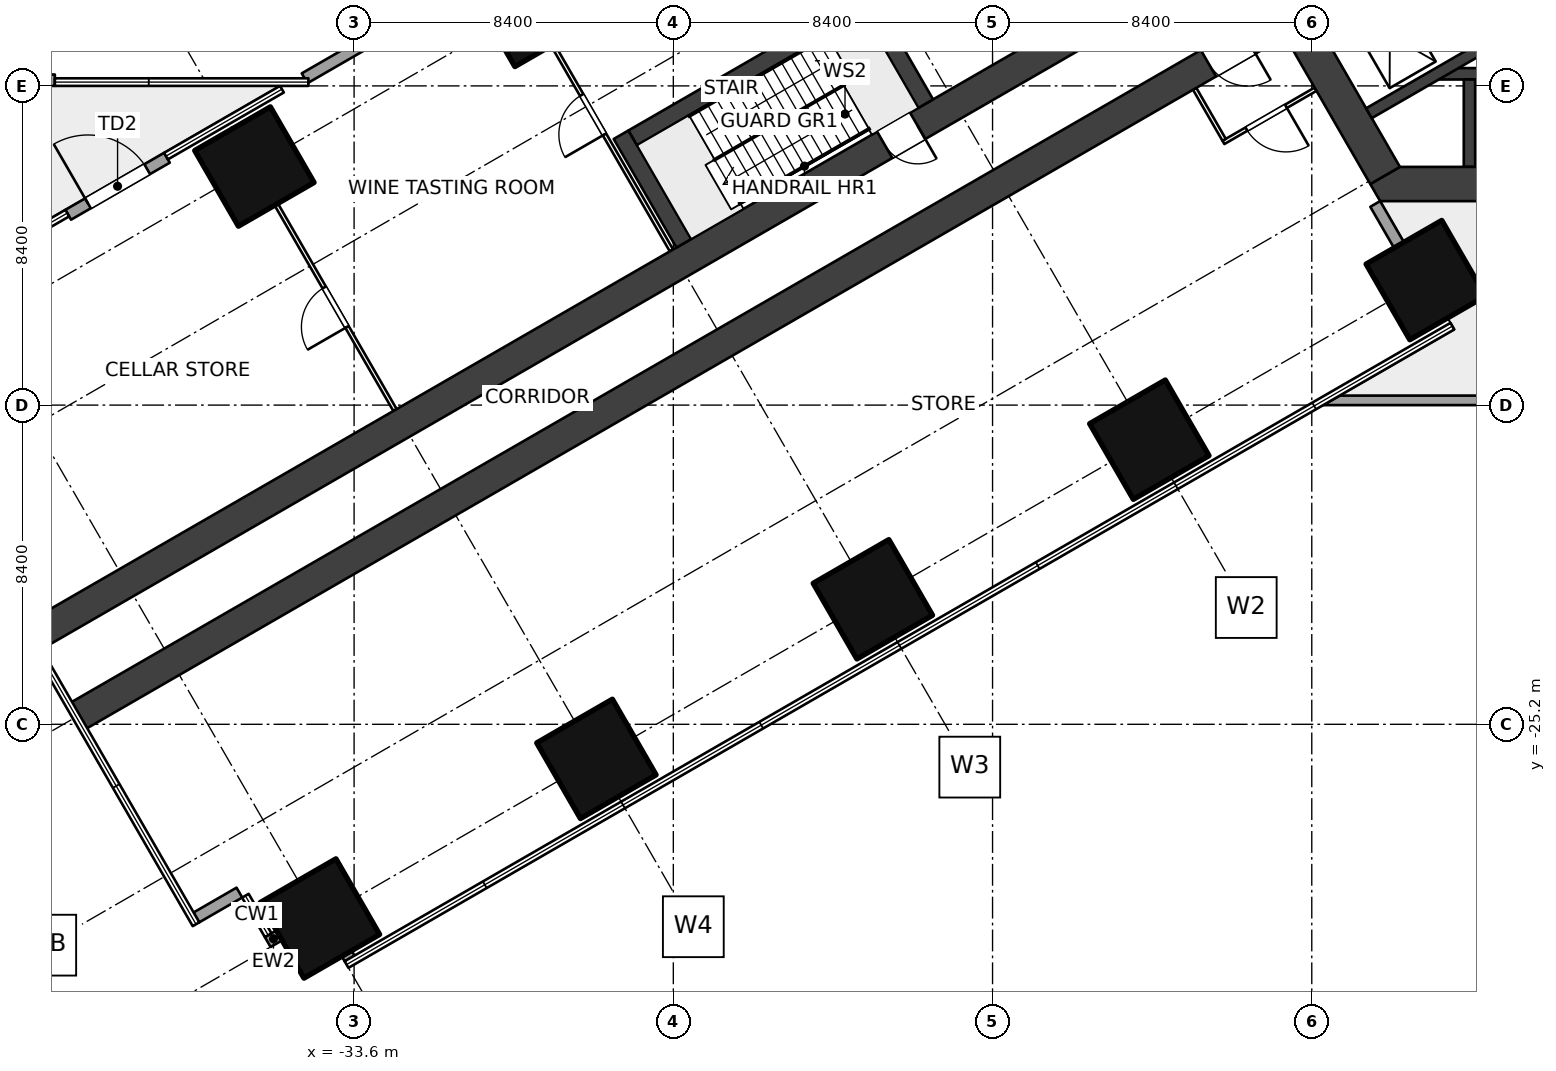
"""IFC4 building model, lengths in metres.
Left out: names, types, materials, properties, quantities, classifications, styles, units other than length and angle.
Written with IfcOpenShell. Run it as: python <this file> out.ifc"""

import sys

from ifc_helpers import new_model, si_unit, direction, frame, frame_2d, origin, origin_2d, place, context, subcontext, project, spatial, polyline, rectangle, outline, extrude, element, fill, save


model = new_model("IFC4")
c1 = context("Model", 3, precision=1e-05, world=origin(), true_north=direction((0.0, 1.0)))
c2 = subcontext(c1, "Body", "Model", "MODEL_VIEW")
j1 = project(units=[si_unit("LENGTHUNIT", "METRE"), si_unit("PLANEANGLEUNIT", "RADIAN")], contexts=[c1])
p1 = place(None, origin())
s1 = spatial("IfcSite", under=j1, at=p1, CompositionType="ELEMENT")
p2 = place(p1, origin())
s2 = spatial("IfcBuilding", under=s1, at=p2, CompositionType="ELEMENT")
p3 = place(p2, frame((0.0, 0.0, 21.0)))
s3 = spatial("IfcBuildingStorey", under=s2, at=p3, CompositionType="ELEMENT", Elevation=21.0)
for number, where, z_axis, x_axis in (
    (1, (-5.4, -13.51, 0.0), (0.0, 0.0, 1.0), (-0.5, 0.866, 0.0)),
    (2, (-12.675, -17.71, 0.0), (0.0, 0.0, 1.0), (-0.5, 0.866, 0.0)),
    (3, (-19.949, -21.91, 0.0), (0.0, 0.0, 1.0), (-0.5, 0.866, 0.0)),
    (4, (-28.949, -6.322, 0.0), (0.0, 0.0, 1.0), (-0.5, 0.866, 0.0)),
    (5, (-27.224, -26.11, 0.0), (0.0, 0.0, 1.0), (-0.5, 0.866, 0.0)),
    (6, (-36.224, -10.521, 0.0), (0.0, 0.0, 1.0), (-0.5, 0.866, 0.0)),
    (7, (-34.499, -30.31, 0.0), (0.0, 0.0, 1.0), (-0.5, 0.866, 0.0)),
):
    element("IfcColumn", number, at=place(p3, frame(where, z_axis=z_axis, x_axis=x_axis)), inside=s3, PredefinedType="COLUMN", context=c2, shape_type="SweptSolid", body=[
        extrude(rectangle(XDim=2.3, YDim=2.3, at=origin_2d()), origin(), (0.0, 0.0, 1.0), 5.0),
    ])
p4 = place(p3, frame((-6.47, -10.757, 0.0), z_axis=(0.0, 0.0, 1.0), x_axis=(-0.499997612506, 0.8660267822, 0.0)))
e8 = element("IfcWall", 8, at=p4, inside=s3, PredefinedType="SHEAR", context=c2, shape_type="SweptSolid", body=[
    extrude(rectangle(XDim=12.161, YDim=0.9, at=frame_2d((6.08, 0.0))), origin(), (0.0, 0.0, 1.0), 5.0),
])
p5 = place(p4, frame((5.33, 0.0, 0.0)))
e9 = element("IfcOpeningElement", 9, at=p5, cuts=e8, PredefinedType="OPENING", context=c2, shape_type="SweptSolid", body=[
    extrude(rectangle(XDim=1.5, YDim=2.1, at=frame_2d((0.75, 1.05))), frame((0.0, 0.46, 0.0), z_axis=(0.0, -1.0, 0.0), x_axis=(1.0, 0.0, 0.0)), (0.0, 0.0, 1.0), 0.92),
])
p6 = place(p3, origin())
e10 = element("IfcWall", 10, at=p6, inside=s3, PredefinedType="SHEAR", context=c2, shape_type="SweptSolid", body=[
    extrude(outline(polyline([(-6.6, -11.432), (6.6, -11.432), (6.86, -10.981), (6.08, -10.531), (-6.08, -10.531), (-6.86, -10.981), (-6.6, -11.432)])), origin(), (0.0, 0.0, 1.0), 5.0),
])
p7 = place(p3, frame((-0.919, -5.669, 0.0), z_axis=(0.0, 0.0, 1.0), x_axis=(-0.866011800373, -0.500023561059, 0.0)))
e11 = element("IfcWall", 11, at=p7, inside=s3, PredefinedType="SHEAR", context=c2, shape_type="SweptSolid", body=[
    extrude(rectangle(XDim=6.902, YDim=0.3, at=frame_2d((3.451, 0.0))), origin(), (0.0, 0.0, 1.0), 5.0),
])
p8 = place(p3, frame((5.098, -8.082, 0.0), z_axis=(0.0, 0.0, 1.0), x_axis=(-1.0, 0.0, 0.0)))
e12 = element("IfcWall", 12, at=p8, inside=s3, PredefinedType="SHEAR", context=c2, shape_type="SweptSolid", body=[
    extrude(rectangle(XDim=10.195, YDim=0.3, at=frame_2d((5.098, 0.0))), origin(), (0.0, 0.0, 1.0), 5.0),
])
p9 = place(p8, frame((1.748, 0.0, 0.0)))
e13 = element("IfcOpeningElement", 13, at=p9, cuts=e12, PredefinedType="OPENING", context=c2, shape_type="SweptSolid", body=[
    extrude(rectangle(XDim=1.1, YDim=2.1, at=frame_2d((0.55, 1.05))), frame((0.0, 0.16, 0.0), z_axis=(0.0, -1.0, 0.0), x_axis=(1.0, 0.0, 0.0)), (0.0, 0.0, 1.0), 0.32),
])
p10 = place(p8, frame((4.548, 0.0, 0.0)))
e14 = element("IfcOpeningElement", 14, at=p10, cuts=e12, PredefinedType="OPENING", context=c2, shape_type="SweptSolid", body=[
    extrude(rectangle(XDim=1.1, YDim=2.1, at=frame_2d((0.55, 1.05))), frame((0.0, 0.16, 0.0), z_axis=(0.0, -1.0, 0.0), x_axis=(1.0, 0.0, 0.0)), (0.0, 0.0, 1.0), 0.32),
])
p11 = place(p8, frame((7.348, 0.0, 0.0)))
e15 = element("IfcOpeningElement", 15, at=p11, cuts=e12, PredefinedType="OPENING", context=c2, shape_type="SweptSolid", body=[
    extrude(rectangle(XDim=1.1, YDim=2.1, at=frame_2d((0.55, 1.05))), frame((0.0, 0.16, 0.0), z_axis=(0.0, -1.0, 0.0), x_axis=(1.0, 0.0, 0.0)), (0.0, 0.0, 1.0), 0.32),
])
p12 = place(p3, frame((-4.25, -8.231, 0.0), z_axis=(0.0, 0.0, 1.0), x_axis=(0.0, -1.0, 0.0)))
e16 = element("IfcWall", 16, at=p12, inside=s3, PredefinedType="SHEAR", context=c2, shape_type="SweptSolid", body=[
    extrude(rectangle(XDim=2.3, YDim=0.3, at=frame_2d((1.15, 0.0))), origin(), (0.0, 0.0, 1.0), 5.0),
])
p13 = place(p3, frame((-8.91, -6.53, 0.0), z_axis=(0.0, 0.0, 1.0), x_axis=(-0.866026214035, -0.499998596603, 0.0)))
e17 = element("IfcWall", 17, at=p13, inside=s3, PredefinedType="SHEAR", context=c2, shape_type="SweptSolid", body=[
    extrude(rectangle(XDim=36.888, YDim=0.8, at=frame_2d((18.444, 0.0))), origin(), (0.0, 0.0, 1.0), 5.0),
])
p14 = place(p13, frame((1.35, 0.0, 0.0)))
e18 = element("IfcOpeningElement", 18, at=p14, cuts=e17, PredefinedType="OPENING", context=c2, shape_type="SweptSolid", body=[
    extrude(rectangle(XDim=1.2, YDim=2.1, at=frame_2d((0.6, 1.05))), frame((0.0, 0.41, 0.0), z_axis=(0.0, -1.0, 0.0), x_axis=(1.0, 0.0, 0.0)), (0.0, 0.0, 1.0), 0.82),
])
p15 = place(p3, frame((-10.11, -4.451, 0.0), z_axis=(0.0, 0.0, 1.0), x_axis=(-0.866023348156, -0.500003560437, 0.0)))
e19 = element("IfcWall", 19, at=p15, inside=s3, PredefinedType="SHEAR", context=c2, shape_type="SweptSolid", body=[
    extrude(rectangle(XDim=36.888, YDim=0.8, at=frame_2d((18.444, 0.0))), origin(), (0.0, 0.0, 1.0), 5.0),
])
p16 = place(p15, frame((10.0, 0.0, 0.0)))
e20 = element("IfcOpeningElement", 20, at=p16, cuts=e19, PredefinedType="OPENING", context=c2, shape_type="SweptSolid", body=[
    extrude(rectangle(XDim=1.0, YDim=2.1, at=frame_2d((0.5, 1.05))), frame((0.0, 0.41, 0.0), z_axis=(0.0, -1.0, 0.0), x_axis=(1.0, 0.0, 0.0)), (0.0, 0.0, 1.0), 0.82),
])
p17 = place(p15, frame((2.85, 0.0, 0.0)))
e21 = element("IfcOpeningElement", 21, at=p17, cuts=e19, PredefinedType="OPENING", context=c2, shape_type="SweptSolid", body=[
    extrude(rectangle(XDim=1.2, YDim=2.1, at=frame_2d((0.6, 1.05))), frame((0.0, 0.41, 0.0), z_axis=(0.0, -1.0, 0.0), x_axis=(1.0, 0.0, 0.0)), (0.0, 0.0, 1.0), 0.82),
])
p18 = place(p3, frame((-35.572, -30.757, 0.0), z_axis=(0.0, 0.0, 1.0), x_axis=(-0.865939549016, -0.500148675346, 0.0)))
e22 = element("IfcWall", 22, at=p18, inside=s3, PredefinedType="SOLIDWALL", context=c2, shape_type="SweptSolid", body=[
    extrude(rectangle(XDim=0.347, YDim=0.3, at=frame_2d((0.174, 0.0))), origin(), (0.0, 0.0, 1.0), 4.6),
])
p19 = place(p3, frame((-36.618, -29.629, 0.0), z_axis=(0.0, 0.0, 1.0), x_axis=(-0.866101796549, -0.4998676605, 0.0)))
e23 = element("IfcWall", 23, at=p19, inside=s3, PredefinedType="SOLIDWALL", context=c2, shape_type="SweptSolid", body=[
    extrude(rectangle(XDim=1.31, YDim=0.3, at=frame_2d((0.655, 0.0))), origin(), (0.0, 0.0, 1.0), 4.6),
])
p20 = place(p3, frame((-41.123, -11.791, 0.0), z_axis=(0.0, 0.0, 1.0), x_axis=(0.866010750942, 0.50002537861, 0.0)))
e24 = element("IfcWall", 24, at=p20, inside=s3, PredefinedType="SOLIDWALL", context=c2, shape_type="SweptSolid", body=[
    extrude(rectangle(XDim=3.0, YDim=0.3, at=frame_2d((1.5, 0.0))), origin(), (0.0, 0.0, 1.0), 4.6),
])
p21 = place(p20, frame((0.6, 0.0, 0.0)))
e25 = element("IfcOpeningElement", 25, at=p21, cuts=e24, PredefinedType="OPENING", context=c2, shape_type="SweptSolid", body=[
    extrude(rectangle(XDim=1.8, YDim=2.4, at=frame_2d((0.9, 1.2))), frame((0.0, 0.16, 0.0), z_axis=(0.0, -1.0, 0.0), x_axis=(1.0, 0.0, 0.0)), (0.0, 0.0, 1.0), 0.32),
])
p22 = place(p3, frame((-41.475, -8.25, 0.0), z_axis=(0.0, 0.0, 1.0), x_axis=(-1.0, 0.0, 0.0)))
e26 = element("IfcWall", 26, at=p22, inside=s3, PredefinedType="SOLIDWALL", context=c2, shape_type="SweptSolid", body=[
    extrude(rectangle(XDim=3.0, YDim=0.3, at=frame_2d((1.5, 0.0))), origin(), (0.0, 0.0, 1.0), 4.6),
])
p23 = place(p22, frame((0.6, 0.0, 0.0)))
e27 = element("IfcOpeningElement", 27, at=p23, cuts=e26, PredefinedType="OPENING", context=c2, shape_type="SweptSolid", body=[
    extrude(rectangle(XDim=1.8, YDim=2.4, at=frame_2d((0.9, 1.2))), frame((0.0, 0.16, 0.0), z_axis=(0.0, -1.0, 0.0), x_axis=(1.0, 0.0, 0.0)), (0.0, 0.0, 1.0), 0.32),
])
p24 = place(p3, frame((-6.73, -11.507, 0.0), z_axis=(0.0, 0.0, 1.0), x_axis=(0.500004234368, -0.866022959057, 0.0)))
e28 = element("IfcWall", 28, at=p24, inside=s3, PredefinedType="SOLIDWALL", context=c2, shape_type="SweptSolid", body=[
    extrude(rectangle(XDim=1.25, YDim=0.3, at=frame_2d((0.625, 0.0))), origin(), (0.0, 0.0, 1.0), 4.6),
])
p25 = place(p3, frame((-33.716, -31.365, 0.0), z_axis=(0.0, 0.0, 1.0), x_axis=(-0.499953773667, 0.866052090925, 0.0)))
e29 = element("IfcWall", 29, at=p25, inside=s3, PredefinedType="SOLIDWALL", context=c2, shape_type="SweptSolid", body=[
    extrude(rectangle(XDim=1.005, YDim=0.3, at=frame_2d((0.502, 0.0))), origin(), (0.0, 0.0, 1.0), 4.6),
])
p26 = place(p3, origin())
e30 = element("IfcWall", 30, at=p26, inside=s3, PredefinedType="PARAPET", context=c2, shape_type="SweptSolid", body=[
    extrude(outline(polyline([(8.096, -16.8), (-8.096, -16.8), (-7.663, -16.55), (7.663, -16.55), (8.096, -16.8)])), origin(), (0.0, 0.0, 1.0), 1.1),
])
p27 = place(p3, frame((-8.3, -8.487, 0.0), z_axis=(0.0, 0.0, 1.0), x_axis=(-0.866034573852, -0.49998411664, 0.0)))
e31 = element("IfcWall", 31, at=p27, inside=s3, PredefinedType="PARTITIONING", context=c2, shape_type="SweptSolid", body=[
    extrude(rectangle(XDim=2.8, YDim=0.1, at=frame_2d((1.4, 0.0))), origin(), (0.0, 0.0, 1.0), 4.6),
])
p28 = place(p27, frame((0.9, 0.0, 0.0)))
e32 = element("IfcOpeningElement", 32, at=p28, cuts=e31, PredefinedType="OPENING", context=c2, shape_type="SweptSolid", body=[
    extrude(rectangle(XDim=1.2, YDim=2.1, at=frame_2d((0.6, 1.05))), frame((0.0, 0.06, 0.0), z_axis=(0.0, -1.0, 0.0), x_axis=(1.0, 0.0, 0.0)), (0.0, 0.0, 1.0), 0.12),
])
p29 = place(p3, frame((-11.482, -8.476, 0.0), z_axis=(0.0, 0.0, 1.0), x_axis=(0.500017819788, -0.86601511528, 0.0)))
e33 = element("IfcWall", 33, at=p29, inside=s3, PredefinedType="PARTITIONING", context=c2, shape_type="SweptSolid", body=[
    extrude(rectangle(XDim=1.55, YDim=0.1, at=frame_2d((0.775, 0.0))), origin(), (0.0, 0.0, 1.0), 4.6),
])
p30 = place(p3, frame((-25.249, -12.73, 0.0), z_axis=(0.0, 0.0, 1.0), x_axis=(-0.499987320047, 0.866032724435, 0.0)))
e34 = element("IfcWall", 34, at=p30, inside=s3, PredefinedType="PARTITIONING", context=c2, shape_type="SweptSolid", body=[
    extrude(rectangle(XDim=6.25, YDim=0.1, at=frame_2d((3.125, 0.0))), origin(), (0.0, 0.0, 1.0), 2.8),
])
p31 = place(p30, frame((3.525, 0.0, 0.0)))
e35 = element("IfcOpeningElement", 35, at=p31, cuts=e34, PredefinedType="OPENING", context=c2, shape_type="SweptSolid", body=[
    extrude(rectangle(XDim=1.2, YDim=2.1, at=frame_2d((0.6, 1.05))), frame((0.0, 0.06, 0.0), z_axis=(0.0, -1.0, 0.0), x_axis=(1.0, 0.0, 0.0)), (0.0, 0.0, 1.0), 0.12),
])
p32 = place(p3, frame((-32.524, -16.93, 0.0), z_axis=(0.0, 0.0, 1.0), x_axis=(-0.500004234368, 0.866022959057, 0.0)))
e36 = element("IfcWall", 36, at=p32, inside=s3, PredefinedType="PARTITIONING", context=c2, shape_type="SweptSolid", body=[
    extrude(rectangle(XDim=6.25, YDim=0.1, at=frame_2d((3.125, 0.0))), origin(), (0.0, 0.0, 1.0), 2.8),
])
p33 = place(p32, frame((2.525, 0.0, 0.0)))
e37 = element("IfcOpeningElement", 37, at=p33, cuts=e36, PredefinedType="OPENING", context=c2, shape_type="SweptSolid", body=[
    extrude(rectangle(XDim=1.2, YDim=2.1, at=frame_2d((0.6, 1.05))), frame((0.0, 0.06, 0.0), z_axis=(0.0, -1.0, 0.0), x_axis=(1.0, 0.0, 0.0)), (0.0, 0.0, 1.0), 0.12),
])
p34 = place(p3, frame((-9.45, 6.495, 0.0), z_axis=(0.0, 0.0, 1.0), x_axis=(-0.866027750123, -0.499995936, 0.0)))
e38 = element("IfcWall", 38, at=p34, inside=s3, PredefinedType="SOLIDWALL", context=c2, shape_type="SweptSolid", body=[
    extrude(rectangle(XDim=29.39, YDim=0.3, at=frame_2d((14.695, 0.0))), origin(), (0.0, 0.0, 1.0), 4.6),
])
p35 = place(p34, frame((18.195, 0.0, 0.0)))
e39 = element("IfcOpeningElement", 39, at=p35, cuts=e38, PredefinedType="OPENING", context=c2, shape_type="SweptSolid", body=[
    extrude(rectangle(XDim=1.8, YDim=2.4, at=frame_2d((0.9, 1.2))), frame((0.0, 0.16, 0.0), z_axis=(0.0, -1.0, 0.0), x_axis=(1.0, 0.0, 0.0)), (0.0, 0.0, 1.0), 0.32),
])
for number, where, z_axis, x_axis in (
    (40, (-18.559, -8.868, 0.0), (0.0, 0.0, 1.0), (-0.5, 0.866, 0.0)),
    (41, (-24.925, -12.543, 0.0), (0.0, 0.0, 1.0), (-0.5, 0.866, 0.0)),
):
    element("IfcWall", number, at=place(p3, frame(where, z_axis=z_axis, x_axis=x_axis)), inside=s3, PredefinedType="SOLIDWALL", context=c2, shape_type="SweptSolid", body=[
        extrude(rectangle(XDim=3.3, YDim=0.45, at=frame_2d((1.65, 0.0))), origin(), (0.0, 0.0, 1.0), 5.0),
    ])
p36 = place(p3, frame((-20.292, -6.317, 0.0), z_axis=(0.0, 0.0, 1.0), x_axis=(-0.866028853923, -0.499994024137, 0.0)))
e42 = element("IfcWall", 42, at=p36, inside=s3, PredefinedType="SOLIDWALL", context=c2, shape_type="SweptSolid", body=[
    extrude(rectangle(XDim=6.9, YDim=0.45, at=frame_2d((3.45, 0.0))), origin(), (0.0, 0.0, 1.0), 5.0),
])
p37 = place(p21, origin())
e43 = element("IfcDoor", 43, at=p37, inside=s3, OperationType="DOUBLE_DOOR_SINGLE_SWING", PredefinedType="DOOR", context=c2, shape_type="SweptSolid", body=[
    extrude(rectangle(XDim=1.8, YDim=2.4, at=frame_2d((0.9, 1.2))), frame((0.0, 0.025, 0.0), z_axis=(0.0, -1.0, 0.0), x_axis=(1.0, 0.0, 0.0)), (0.0, 0.0, 1.0), 0.05),
])
fill(e25, e43)
p38 = place(p16, origin())
e44 = element("IfcDoor", 44, at=p38, inside=s3, OperationType="SINGLE_SWING_LEFT", PredefinedType="DOOR", context=c2, shape_type="SweptSolid", body=[
    extrude(rectangle(XDim=1.0, YDim=2.1, at=frame_2d((0.5, 1.05))), frame((0.0, 0.025, 0.0), z_axis=(0.0, -1.0, 0.0), x_axis=(1.0, 0.0, 0.0)), (0.0, 0.0, 1.0), 0.05),
])
fill(e20, e44)
p39 = place(p14, origin())
e45 = element("IfcDoor", 45, at=p39, inside=s3, OperationType="DOUBLE_SWING_LEFT", PredefinedType="DOOR", context=c2, shape_type="SweptSolid", body=[
    extrude(rectangle(XDim=1.2, YDim=2.1, at=frame_2d((0.6, 1.05))), frame((0.0, 0.025, 0.0), z_axis=(0.0, -1.0, 0.0), x_axis=(1.0, 0.0, 0.0)), (0.0, 0.0, 1.0), 0.05),
])
fill(e18, e45)
p40 = place(p28, origin())
e46 = element("IfcDoor", 46, at=p40, inside=s3, OperationType="DOUBLE_SWING_LEFT", PredefinedType="DOOR", context=c2, shape_type="SweptSolid", body=[
    extrude(rectangle(XDim=1.2, YDim=2.1, at=frame_2d((0.6, 1.05))), frame((0.0, 0.025, 0.0), z_axis=(0.0, -1.0, 0.0), x_axis=(1.0, 0.0, 0.0)), (0.0, 0.0, 1.0), 0.05),
])
fill(e32, e46)
p41 = place(p31, origin())
e47 = element("IfcDoor", 47, at=p41, inside=s3, OperationType="DOUBLE_SWING_LEFT", PredefinedType="DOOR", context=c2, shape_type="SweptSolid", body=[
    extrude(rectangle(XDim=1.2, YDim=2.1, at=frame_2d((0.6, 1.05))), frame((0.0, 0.025, 0.0), z_axis=(0.0, -1.0, 0.0), x_axis=(1.0, 0.0, 0.0)), (0.0, 0.0, 1.0), 0.05),
])
fill(e35, e47)
p42 = place(p33, origin())
e48 = element("IfcDoor", 48, at=p42, inside=s3, OperationType="DOUBLE_SWING_LEFT", PredefinedType="DOOR", context=c2, shape_type="SweptSolid", body=[
    extrude(rectangle(XDim=1.2, YDim=2.1, at=frame_2d((0.6, 1.05))), frame((0.0, 0.025, 0.0), z_axis=(0.0, -1.0, 0.0), x_axis=(1.0, 0.0, 0.0)), (0.0, 0.0, 1.0), 0.05),
])
fill(e37, e48)
save(model, sys.argv[1])
